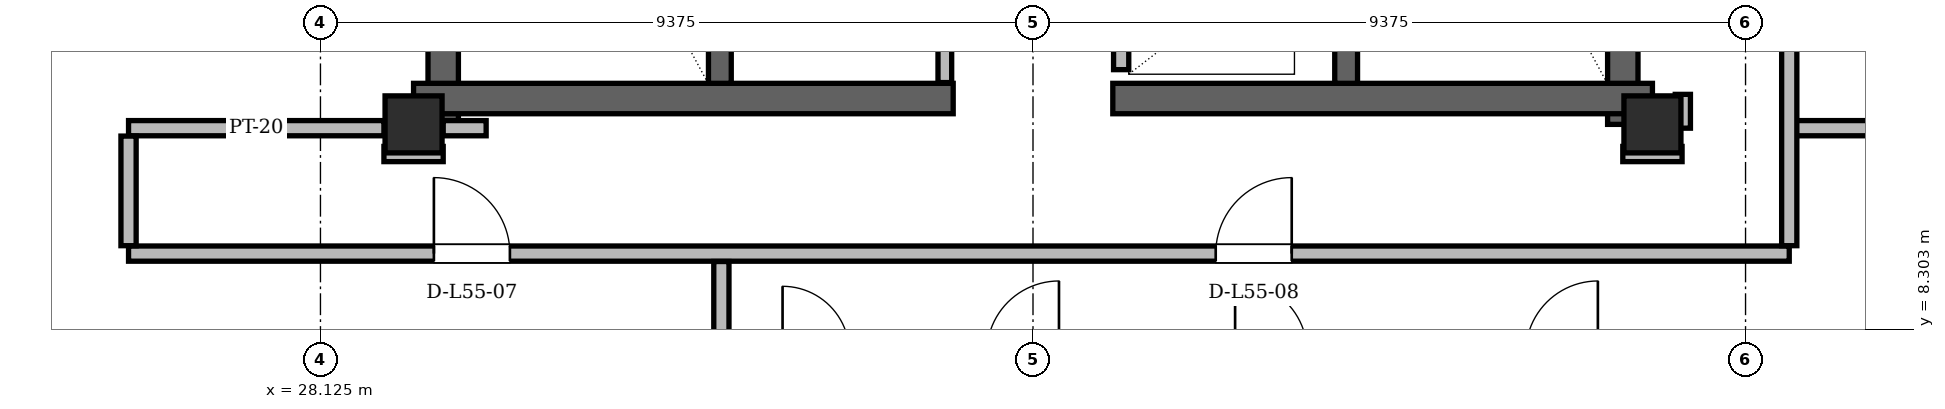
"""IFC4 building model, lengths in metres.
Left out: names, types, materials, properties, quantities, classifications, styles, units other than length and angle.
Written with IfcOpenShell. Run it as: python <this file> out.ifc"""

import sys

from ifc_helpers import new_model, si_unit, direction, frame, frame_2d, origin, origin_2d, place, context, subcontext, project, spatial, rectangle, hollow_rectangle, extrude, element, fill, save


model = new_model("IFC4")
c1 = context("Model", 3, precision=1e-05, world=origin(), true_north=direction((0.0, 1.0)))
c2 = subcontext(c1, "Body", "Model", "MODEL_VIEW")
j1 = project(units=[si_unit("LENGTHUNIT", "METRE"), si_unit("PLANEANGLEUNIT", "RADIAN")], contexts=[c1])
p1 = place(None, origin())
s1 = spatial("IfcSite", under=j1, at=p1, CompositionType="ELEMENT")
p2 = place(p1, origin())
s2 = spatial("IfcBuilding", under=s1, at=p2, CompositionType="ELEMENT")
p3 = place(p2, frame((0.0, 0.0, 209.1)))
s3 = spatial("IfcBuildingStorey", under=s2, at=p3, CompositionType="ELEMENT", Elevation=209.1)
for number, where, z_axis, x_axis in (
    (1, (29.35, 11.0, 0.0), (0.0, 0.0, 1.0), (1.0, 0.0, 0.0)),
    (2, (45.65, 11.0, 0.0), (0.0, 0.0, 1.0), (1.0, 0.0, 0.0)),
):
    element("IfcColumn", number, at=place(p3, frame(where, z_axis=z_axis, x_axis=x_axis)), inside=s3, PredefinedType="COLUMN", context=c2, shape_type="SweptSolid", body=[
        extrude(hollow_rectangle(XDim=0.75, YDim=0.75, WallThickness=0.06, at=origin_2d()), origin(), (0.0, 0.0, 1.0), 3.6),
    ])
for number, where, z_axis, x_axis in (
    (3, (29.74, 11.0, 0.0), (0.0, 0.0, 1.0), (0.0, 1.0, 0.0)),
    (4, (45.26, 11.0, 0.0), (0.0, 0.0, 1.0), (0.0, 1.0, 0.0)),
):
    element("IfcWall", number, at=place(p3, frame(where, z_axis=z_axis, x_axis=x_axis)), inside=s3, PredefinedType="SHEAR", context=c2, shape_type="SweptSolid", body=[
        extrude(rectangle(XDim=13.3, YDim=0.4, at=frame_2d((6.65, 0.0))), origin(), (0.0, 0.0, 1.0), 3.38),
    ])
for number, where, z_axis, x_axis in (
    (5, (29.35, 11.34, 0.0), (0.0, 0.0, 1.0), (1.0, 0.0, 0.0)),
    (6, (38.55, 11.34, 0.0), (0.0, 0.0, 1.0), (1.0, 0.0, 0.0)),
):
    element("IfcWall", number, at=place(p3, frame(where, z_axis=z_axis, x_axis=x_axis)), inside=s3, PredefinedType="SHEAR", context=c2, shape_type="SweptSolid", body=[
        extrude(rectangle(XDim=7.1, YDim=0.4, at=frame_2d((3.55, 0.0))), origin(), (0.0, 0.0, 1.0), 3.38),
    ])
for number, where, z_axis, x_axis in (
    (7, (33.38, 11.54, 0.0), (0.0, 0.0, 1.0), (0.0, 1.0, 0.0)),
    (8, (41.62, 11.54, 0.0), (0.0, 0.0, 1.0), (0.0, 1.0, 0.0)),
):
    element("IfcWall", number, at=place(p3, frame(where, z_axis=z_axis, x_axis=x_axis)), inside=s3, PredefinedType="SHEAR", context=c2, shape_type="SweptSolid", body=[
        extrude(rectangle(XDim=7.62, YDim=0.3, at=frame_2d((3.81, 0.0))), origin(), (0.0, 0.0, 1.0), 3.38),
    ])
p4 = place(p3, frame((59.246, 11.601, 0.0), z_axis=(0.0, 0.0, 1.0), x_axis=(-0.50000139879, 0.866024596191, 0.0)))
e9 = element("IfcWall", 9, at=p4, inside=s3, PredefinedType="SOLIDWALL", context=c2, shape_type="SweptSolid", body=[
    extrude(rectangle(XDim=36.467, YDim=0.29, at=frame_2d((18.233, 0.0))), origin(), (0.0, 0.0, 1.0), 2.677),
])
p5 = place(p4, frame((6.789, 0.0, 0.0)))
e10 = element("IfcOpeningElement", 10, at=p5, cuts=e9, PredefinedType="OPENING", context=c2, shape_type="SweptSolid", body=[
    extrude(rectangle(XDim=1.5, YDim=2.2, at=frame_2d((0.75, 1.1))), frame((0.0, 0.145, 0.0), z_axis=(0.0, -1.0, 0.0), x_axis=(1.0, 0.0, 0.0)), (0.0, 0.0, 1.0), 0.29),
])
p6 = place(p4, frame((26.932, 0.0, 0.0)))
e11 = element("IfcOpeningElement", 11, at=p6, cuts=e9, PredefinedType="OPENING", context=c2, shape_type="SweptSolid", body=[
    extrude(rectangle(XDim=1.5, YDim=2.2, at=frame_2d((0.75, 1.1))), frame((0.0, 0.145, 0.0), z_axis=(0.0, -1.0, 0.0), x_axis=(1.0, 0.0, 0.0)), (0.0, 0.0, 1.0), 0.29),
])
p7 = place(p4, frame((12.324, 0.0, 0.85)))
e12 = element("IfcOpeningElement", 12, at=p7, cuts=e9, PredefinedType="OPENING", context=c2, shape_type="SweptSolid", body=[
    extrude(rectangle(XDim=1.2, YDim=1.48, at=frame_2d((0.6, 0.74))), frame((0.0, 0.145, 0.0), z_axis=(0.0, -1.0, 0.0), x_axis=(1.0, 0.0, 0.0)), (0.0, 0.0, 1.0), 0.29),
])
p8 = place(p4, frame((2.218, 0.0, 0.85)))
e13 = element("IfcOpeningElement", 13, at=p8, cuts=e9, PredefinedType="OPENING", context=c2, shape_type="SweptSolid", body=[
    extrude(rectangle(XDim=1.2, YDim=1.48, at=frame_2d((0.6, 0.74))), frame((0.0, 0.145, 0.0), z_axis=(0.0, -1.0, 0.0), x_axis=(1.0, 0.0, 0.0)), (0.0, 0.0, 1.0), 0.29),
])
p9 = place(p4, frame((17.24, 0.0, 0.85)))
e14 = element("IfcOpeningElement", 14, at=p9, cuts=e9, PredefinedType="OPENING", context=c2, shape_type="SweptSolid", body=[
    extrude(rectangle(XDim=2.6, YDim=1.717, at=frame_2d((1.3, 0.858))), frame((0.0, 0.145, 0.0), z_axis=(0.0, -1.0, 0.0), x_axis=(1.0, 0.0, 0.0)), (0.0, 0.0, 1.0), 0.29),
])
p10 = place(p4, frame((34.098, 0.0, 0.85)))
e15 = element("IfcOpeningElement", 15, at=p10, cuts=e9, PredefinedType="OPENING", context=c2, shape_type="SweptSolid", body=[
    extrude(rectangle(XDim=1.2, YDim=1.48, at=frame_2d((0.6, 0.74))), frame((0.0, 0.145, 0.0), z_axis=(0.0, -1.0, 0.0), x_axis=(1.0, 0.0, 0.0)), (0.0, 0.0, 1.0), 0.29),
])
p11 = place(p3, frame((33.988, 43.182, 0.0), z_axis=(0.0, 0.0, 1.0), x_axis=(-0.50000139879, -0.866024596191, 0.0)))
e16 = element("IfcWall", 16, at=p11, inside=s3, PredefinedType="SOLIDWALL", context=c2, shape_type="SweptSolid", body=[
    extrude(rectangle(XDim=36.467, YDim=0.29, at=frame_2d((18.233, 0.0))), origin(), (0.0, 0.0, 1.0), 2.677),
])
p12 = place(p11, frame((3.429, 0.0, 0.0)))
e17 = element("IfcOpeningElement", 17, at=p12, cuts=e16, PredefinedType="OPENING", context=c2, shape_type="SweptSolid", body=[
    extrude(rectangle(XDim=1.5, YDim=2.2, at=frame_2d((0.75, 1.1))), frame((0.0, 0.145, 0.0), z_axis=(0.0, -1.0, 0.0), x_axis=(1.0, 0.0, 0.0)), (0.0, 0.0, 1.0), 0.29),
])
p13 = place(p11, frame((26.722, 0.0, 0.0)))
e18 = element("IfcOpeningElement", 18, at=p13, cuts=e16, PredefinedType="OPENING", context=c2, shape_type="SweptSolid", body=[
    extrude(rectangle(XDim=1.5, YDim=2.2, at=frame_2d((0.75, 1.1))), frame((0.0, 0.145, 0.0), z_axis=(0.0, -1.0, 0.0), x_axis=(1.0, 0.0, 0.0)), (0.0, 0.0, 1.0), 0.29),
])
p14 = place(p11, frame((33.056, 0.0, 0.85)))
e19 = element("IfcOpeningElement", 19, at=p14, cuts=e16, PredefinedType="OPENING", context=c2, shape_type="SweptSolid", body=[
    extrude(rectangle(XDim=1.6, YDim=1.7, at=frame_2d((0.8, 0.85))), frame((0.0, 0.145, 0.0), z_axis=(0.0, -1.0, 0.0), x_axis=(1.0, 0.0, 0.0)), (0.0, 0.0, 1.0), 0.29),
])
p15 = place(p11, frame((22.736, 0.0, 0.85)))
e20 = element("IfcOpeningElement", 20, at=p15, cuts=e16, PredefinedType="OPENING", context=c2, shape_type="SweptSolid", body=[
    extrude(rectangle(XDim=1.2, YDim=1.48, at=frame_2d((0.6, 0.74))), frame((0.0, 0.145, 0.0), z_axis=(0.0, -1.0, 0.0), x_axis=(1.0, 0.0, 0.0)), (0.0, 0.0, 1.0), 0.29),
])
p16 = place(p3, frame((36.34, 11.55, 0.0), z_axis=(0.0, 0.0, 1.0), x_axis=(0.0, 1.0, 0.0)))
e21 = element("IfcWall", 21, at=p16, inside=s3, PredefinedType="PARTITIONING", context=c2, shape_type="SweptSolid", body=[
    extrude(rectangle(XDim=5.55, YDim=0.18, at=frame_2d((2.775, 0.0))), origin(), (0.0, 0.0, 1.0), 3.38),
])
p17 = place(p16, frame((0.55, 0.0, 0.0)))
e22 = element("IfcOpeningElement", 22, at=p17, cuts=e21, PredefinedType="OPENING", context=c2, shape_type="SweptSolid", body=[
    extrude(rectangle(XDim=0.88, YDim=2.08, at=frame_2d((0.44, 1.04))), frame((0.0, 0.09, 0.0), z_axis=(0.0, -1.0, 0.0), x_axis=(1.0, 0.0, 0.0)), (0.0, 0.0, 1.0), 0.18),
])
p18 = place(p16, frame((3.25, 0.0, 0.0)))
e23 = element("IfcOpeningElement", 23, at=p18, cuts=e21, PredefinedType="OPENING", context=c2, shape_type="SweptSolid", body=[
    extrude(rectangle(XDim=0.88, YDim=2.08, at=frame_2d((0.44, 1.04))), frame((0.0, 0.09, 0.0), z_axis=(0.0, -1.0, 0.0), x_axis=(1.0, 0.0, 0.0)), (0.0, 0.0, 1.0), 0.18),
])
p19 = place(p3, frame((38.66, 11.72, 0.0), z_axis=(0.0, 0.0, 1.0), x_axis=(0.0, 1.0, 0.0)))
e24 = element("IfcWall", 24, at=p19, inside=s3, PredefinedType="PARTITIONING", context=c2, shape_type="SweptSolid", body=[
    extrude(rectangle(XDim=9.1, YDim=0.2, at=frame_2d((4.55, 0.0))), origin(), (0.0, 0.0, 1.0), 3.38),
])
p20 = place(p19, frame((5.905, 0.0, 0.0)))
e25 = element("IfcOpeningElement", 25, at=p20, cuts=e24, PredefinedType="OPENING", context=c2, shape_type="SweptSolid", body=[
    extrude(rectangle(XDim=1.05, YDim=2.15, at=frame_2d((0.525, 1.075))), frame((0.0, 0.1, 0.0), z_axis=(0.0, -1.0, 0.0), x_axis=(1.0, 0.0, 0.0)), (0.0, 0.0, 1.0), 0.2),
])
p21 = place(p19, frame((7.705, 0.0, 0.0)))
e26 = element("IfcOpeningElement", 26, at=p21, cuts=e24, PredefinedType="OPENING", context=c2, shape_type="SweptSolid", body=[
    extrude(rectangle(XDim=1.05, YDim=2.15, at=frame_2d((0.525, 1.075))), frame((0.0, 0.1, 0.0), z_axis=(0.0, -1.0, 0.0), x_axis=(1.0, 0.0, 0.0)), (0.0, 0.0, 1.0), 0.2),
])
p22 = place(p3, frame((25.6, 9.3, 0.0), z_axis=(0.0, 0.0, 1.0), x_axis=(1.0, 0.0, 0.0)))
e27 = element("IfcWall", 27, at=p22, inside=s3, PredefinedType="PARTITIONING", context=c2, shape_type="SweptSolid", body=[
    extrude(rectangle(XDim=21.85, YDim=0.2, at=frame_2d((10.925, 0.0))), origin(), (0.0, 0.0, 1.0), 2.913),
])
p23 = place(p22, frame((4.018, 0.0, 0.0)))
e28 = element("IfcOpeningElement", 28, at=p23, cuts=e27, PredefinedType="OPENING", context=c2, shape_type="SweptSolid", body=[
    extrude(rectangle(XDim=1.0, YDim=2.18, at=frame_2d((0.5, 1.09))), frame((0.0, 0.1, 0.0), z_axis=(0.0, -1.0, 0.0), x_axis=(1.0, 0.0, 0.0)), (0.0, 0.0, 1.0), 0.2),
])
p24 = place(p22, frame((14.304, 0.0, 0.0)))
e29 = element("IfcOpeningElement", 29, at=p24, cuts=e27, PredefinedType="OPENING", context=c2, shape_type="SweptSolid", body=[
    extrude(rectangle(XDim=1.0, YDim=2.18, at=frame_2d((0.5, 1.09))), frame((0.0, 0.1, 0.0), z_axis=(0.0, -1.0, 0.0), x_axis=(1.0, 0.0, 0.0)), (0.0, 0.0, 1.0), 0.2),
])
for number, where, z_axis, x_axis in (
    (30, (28.96, 10.61, 0.0), (0.0, 0.0, 1.0), (1.0, 0.0, 0.0)),
    (31, (45.26, 10.61, 0.0), (0.0, 0.0, 1.0), (1.0, 0.0, 0.0)),
):
    element("IfcWall", number, at=place(p3, frame(where, z_axis=z_axis, x_axis=x_axis)), inside=s3, PredefinedType="PARTITIONING", context=c2, shape_type="SweptSolid", body=[
        extrude(rectangle(XDim=0.78, YDim=0.2, at=frame_2d((0.39, 0.0))), origin(), (0.0, 0.0, 1.0), 3.38),
    ])
p25 = place(p3, frame((25.6, 10.95, 0.0), z_axis=(0.0, 0.0, 1.0), x_axis=(1.0, 0.0, 0.0)))
e32 = element("IfcWall", 32, at=p25, inside=s3, PredefinedType="PARTITIONING", context=c2, shape_type="SweptSolid", body=[
    extrude(rectangle(XDim=3.36, YDim=0.2, at=frame_2d((1.68, 0.0))), origin(), (0.0, 0.0, 1.0), 2.913),
])
p26 = place(p3, frame((29.74, 10.95, 0.0), z_axis=(0.0, 0.0, 1.0), x_axis=(1.0, 0.0, 0.0)))
e33 = element("IfcWall", 33, at=p26, inside=s3, PredefinedType="PARTITIONING", context=c2, shape_type="SweptSolid", body=[
    extrude(rectangle(XDim=0.565, YDim=0.2, at=frame_2d((0.282, 0.0))), origin(), (0.0, 0.0, 1.0), 2.52),
])
p27 = place(p3, frame((47.45, 10.95, 0.0), z_axis=(0.0, 0.0, 1.0), x_axis=(1.0, 0.0, 0.0)))
e34 = element("IfcWall", 34, at=p27, inside=s3, PredefinedType="PARTITIONING", context=c2, shape_type="SweptSolid", body=[
    extrude(rectangle(XDim=11.248, YDim=0.2, at=frame_2d((5.624, 0.0))), origin(), (0.0, 0.0, 1.0), 2.913),
])
p28 = place(p3, frame((25.6, 9.404, 0.0), z_axis=(0.0, 0.0, 1.0), x_axis=(0.0, 1.0, 0.0)))
e35 = element("IfcWall", 35, at=p28, inside=s3, PredefinedType="PARTITIONING", context=c2, shape_type="SweptSolid", body=[
    extrude(rectangle(XDim=1.442, YDim=0.2, at=frame_2d((0.721, 0.0))), origin(), (0.0, 0.0, 1.0), 3.38),
])
p29 = place(p3, frame((33.4, 5.666, 0.0), z_axis=(0.0, 0.0, 1.0), x_axis=(0.0, 1.0, 0.0)))
e36 = element("IfcWall", 36, at=p29, inside=s3, PredefinedType="PARTITIONING", context=c2, shape_type="SweptSolid", body=[
    extrude(rectangle(XDim=3.53, YDim=0.2, at=frame_2d((1.765, 0.0))), origin(), (0.0, 0.0, 1.0), 3.38),
])
p30 = place(p3, frame((46.05, 10.95, 0.0), z_axis=(0.0, 0.0, 1.0), x_axis=(0.0, 1.0, 0.0)))
e37 = element("IfcWall", 37, at=p30, inside=s3, PredefinedType="PARTITIONING", context=c2, shape_type="SweptSolid", body=[
    extrude(rectangle(XDim=0.445, YDim=0.2, at=frame_2d((0.223, 0.0))), origin(), (0.0, 0.0, 1.0), 2.913),
])
p31 = place(p3, frame((47.45, 9.404, 0.0), z_axis=(0.0, 0.0, 1.0), x_axis=(0.0, 1.0, 0.0)))
e38 = element("IfcWall", 38, at=p31, inside=s3, PredefinedType="PARTITIONING", context=c2, shape_type="SweptSolid", body=[
    extrude(rectangle(XDim=16.462, YDim=0.2, at=frame_2d((8.231, 0.0))), origin(), (0.0, 0.0, 1.0), 2.913),
])
p32 = place(p31, frame((9.496, 0.0, 0.0)))
e39 = element("IfcOpeningElement", 39, at=p32, cuts=e38, PredefinedType="OPENING", context=c2, shape_type="SweptSolid", body=[
    extrude(rectangle(XDim=1.0, YDim=2.18, at=frame_2d((0.5, 1.09))), frame((0.0, 0.1, 0.0), z_axis=(0.0, -1.0, 0.0), x_axis=(1.0, 0.0, 0.0)), (0.0, 0.0, 1.0), 0.2),
])
p33 = place(p23, origin())
e40 = element("IfcDoor", 40, at=p33, inside=s3, OperationType="SINGLE_SWING_LEFT", PredefinedType="DOOR", context=c2, shape_type="SweptSolid", body=[
    extrude(rectangle(XDim=1.0, YDim=2.18, at=frame_2d((0.5, 1.09))), frame((0.0, 0.025, 0.0), z_axis=(0.0, -1.0, 0.0), x_axis=(1.0, 0.0, 0.0)), (0.0, 0.0, 1.0), 0.05),
])
fill(e28, e40)
p34 = place(p24, origin())
e41 = element("IfcDoor", 41, at=p34, inside=s3, OperationType="SINGLE_SWING_RIGHT", PredefinedType="DOOR", context=c2, shape_type="SweptSolid", body=[
    extrude(rectangle(XDim=1.0, YDim=2.18, at=frame_2d((0.5, 1.09))), frame((0.0, 0.025, 0.0), z_axis=(0.0, -1.0, 0.0), x_axis=(1.0, 0.0, 0.0)), (0.0, 0.0, 1.0), 0.05),
])
fill(e29, e41)
save(model, sys.argv[1])
